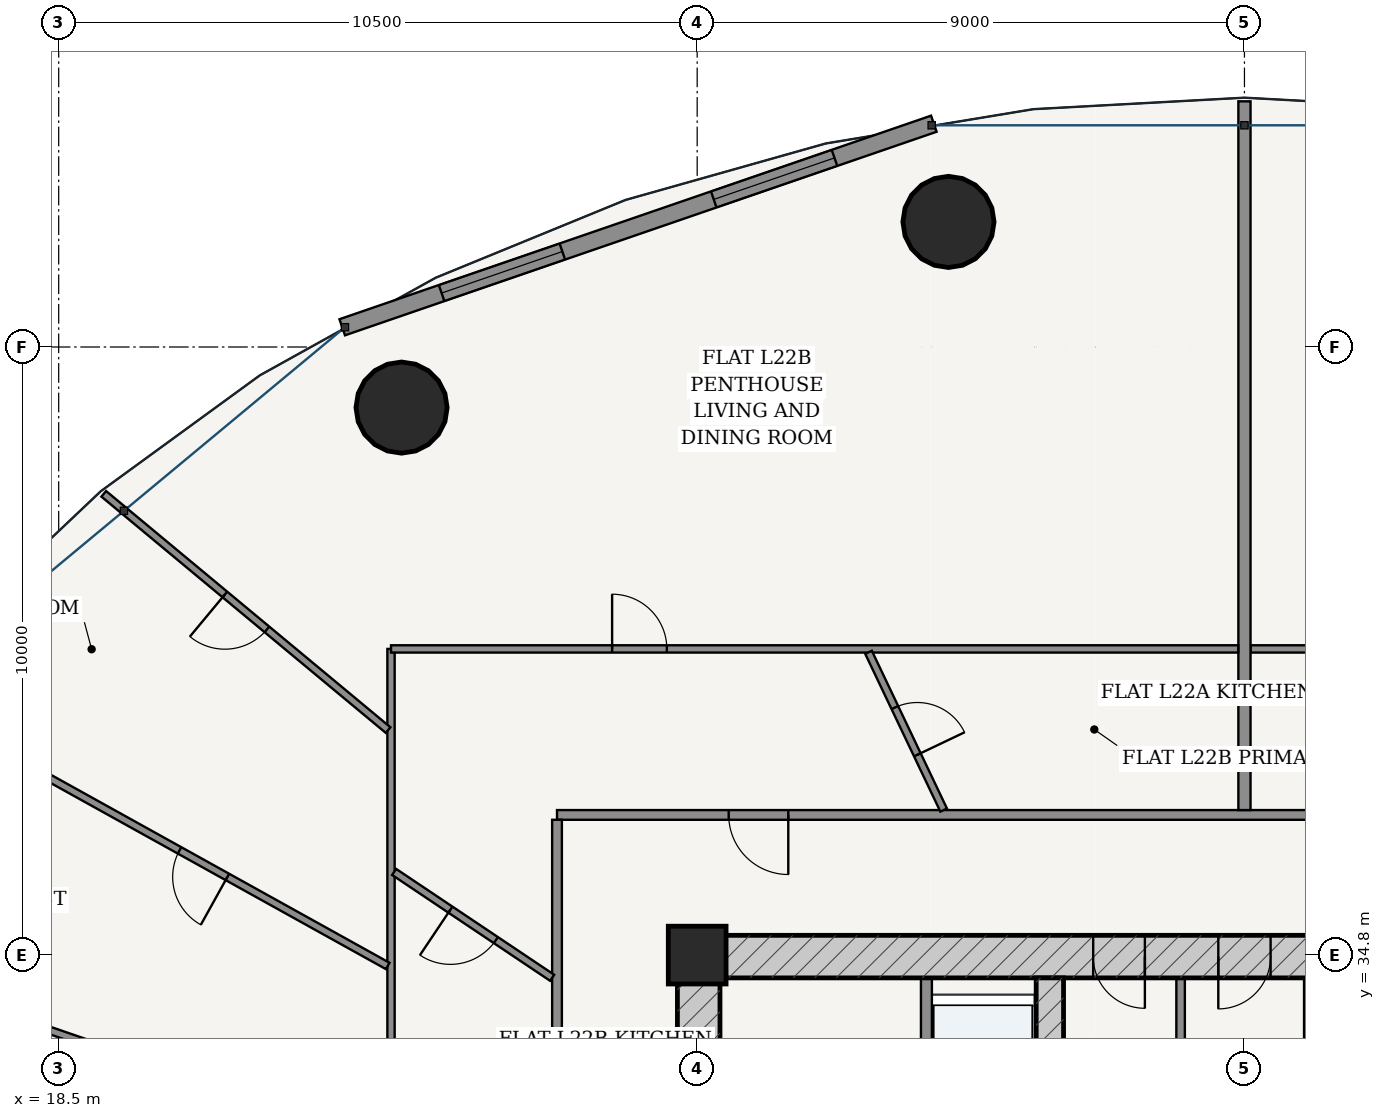
"""IFC4 building model, lengths in metres.
Left out: names, types, materials, properties, quantities, classifications, styles, units other than length and angle.
Written with IfcOpenShell. Run it as: python <this file> out.ifc"""

import sys

from ifc_helpers import new_model, si_unit, direction, frame, frame_2d, origin, origin_2d, place, context, subcontext, project, spatial, rectangle, hollow_circle, extrude, source, transform, mapped, element, fill, save


model = new_model("IFC4")
c1 = context("Model", 3, precision=1e-05, world=origin(), true_north=direction((-0.2419218956, 0.970295726276)))
c2 = subcontext(c1, "Body", "Model", "MODEL_VIEW")
j1 = project(units=[si_unit("LENGTHUNIT", "METRE"), si_unit("PLANEANGLEUNIT", "RADIAN")], contexts=[c1])
p1 = place(None, origin())
s1 = spatial("IfcSite", under=j1, at=p1, CompositionType="ELEMENT")
p2 = place(p1, origin())
s2 = spatial("IfcBuilding", under=s1, at=p2, CompositionType="ELEMENT")
p3 = place(p2, frame((0.0, 0.0, 87.0)))
s3 = spatial("IfcBuildingStorey", under=s2, at=p3, CompositionType="ELEMENT", Elevation=87.0)
p4 = place(p3, frame((29.0, 34.8, 0.0), z_axis=(0.0, 0.0, 1.0), x_axis=(1.0, 0.0, 0.0)))
e1 = element("IfcColumn", 1, at=p4, inside=s3, PredefinedType="COLUMN", context=c2, shape_type="SweptSolid", body=[
    extrude(rectangle(XDim=0.95, YDim=0.95, at=origin_2d()), origin(), (0.0, 0.0, 1.0), 3.6),
])
p5 = place(p3, frame((28.675, 34.775, 0.0), z_axis=(0.0, 0.0, 1.0), x_axis=(1.0, 0.0, 0.0)))
e2 = element("IfcWall", 2, at=p5, inside=s3, PredefinedType="SHEAR", context=c2, shape_type="SweptSolid", body=[
    extrude(rectangle(XDim=18.65, YDim=0.7, at=frame_2d((9.325, 0.0))), origin(), (0.0, 0.0, 1.0), 3.325),
])
p6 = place(p5, frame((6.837, 0.0, 0.0)))
e3 = element("IfcOpeningElement", 3, at=p6, cuts=e2, PredefinedType="OPENING", context=c2, shape_type="SweptSolid", body=[
    extrude(rectangle(XDim=0.85, YDim=2.1, at=frame_2d((0.425, 1.05))), frame((0.0, 0.36, 0.0), z_axis=(0.0, -1.0, 0.0), x_axis=(1.0, 0.0, 0.0)), (0.0, 0.0, 1.0), 0.72),
])
p7 = place(p5, frame((8.895, 0.0, 0.0)))
e4 = element("IfcOpeningElement", 4, at=p7, cuts=e2, PredefinedType="OPENING", context=c2, shape_type="SweptSolid", body=[
    extrude(rectangle(XDim=0.86, YDim=2.1, at=frame_2d((0.43, 1.05))), frame((0.0, 0.36, 0.0), z_axis=(0.0, -1.0, 0.0), x_axis=(1.0, 0.0, 0.0)), (0.0, 0.0, 1.0), 0.72),
])
p8 = place(p5, frame((10.962, 0.0, 0.0)))
e5 = element("IfcOpeningElement", 5, at=p8, cuts=e2, PredefinedType="OPENING", context=c2, shape_type="SweptSolid", body=[
    extrude(rectangle(XDim=0.85, YDim=2.1, at=frame_2d((0.425, 1.05))), frame((0.0, 0.36, 0.0), z_axis=(0.0, -1.0, 0.0), x_axis=(1.0, 0.0, 0.0)), (0.0, 0.0, 1.0), 0.72),
])
p9 = place(p3, frame((29.025, 19.175, 0.0), z_axis=(0.0, 0.0, 1.0), x_axis=(0.0, 1.0, 0.0)))
e6 = element("IfcWall", 6, at=p9, inside=s3, PredefinedType="SHEAR", context=c2, shape_type="SweptSolid", body=[
    extrude(rectangle(XDim=15.25, YDim=0.7, at=frame_2d((7.625, 0.0))), origin(), (0.0, 0.0, 1.0), 3.325),
])
p10 = place(p9, frame((9.875, 0.0, 0.0)))
e7 = element("IfcOpeningElement", 7, at=p10, cuts=e6, PredefinedType="OPENING", context=c2, shape_type="SweptSolid", body=[
    extrude(rectangle(XDim=1.5, YDim=2.2, at=frame_2d((0.75, 1.1))), frame((0.0, 0.36, 0.0), z_axis=(0.0, -1.0, 0.0), x_axis=(1.0, 0.0, 0.0)), (0.0, 0.0, 1.0), 0.72),
])
p11 = place(p3, frame((34.8, 19.175, 0.0), z_axis=(0.0, 0.0, 1.0), x_axis=(0.0, 1.0, 0.0)))
e8 = element("IfcWall", 8, at=p11, inside=s3, PredefinedType="SHEAR", context=c2, shape_type="SweptSolid", body=[
    extrude(rectangle(XDim=15.25, YDim=0.45, at=frame_2d((7.625, 0.0))), origin(), (0.0, 0.0, 1.0), 3.325),
])
p12 = place(p11, frame((7.8, 0.0, 0.0)))
e9 = element("IfcOpeningElement", 9, at=p12, cuts=e8, PredefinedType="OPENING", context=c2, shape_type="SweptSolid", body=[
    extrude(rectangle(XDim=1.05, YDim=2.15, at=frame_2d((0.525, 1.075))), frame((0.0, 0.235, 0.0), z_axis=(0.0, -1.0, 0.0), x_axis=(1.0, 0.0, 0.0)), (0.0, 0.0, 1.0), 0.47),
])
for number, where, z_axis, x_axis in (
    (10, (33.133, 46.857, 0.0), (0.0, 0.0, 1.0), (1.0, 0.0, 0.0)),
    (11, (24.138, 43.803, 0.0), (0.0, 0.0, 1.0), (1.0, 0.0, 0.0)),
):
    element("IfcColumn", number, at=place(p3, frame(where, z_axis=z_axis, x_axis=x_axis)), inside=s3, PredefinedType="COLUMN", context=c2, shape_type="SweptSolid", body=[
        extrude(hollow_circle(Radius=0.75, WallThickness=0.045, at=origin_2d()), origin(), (0.0, 0.0, 1.0), 3.6),
    ])
p13 = place(p3, frame((32.892, 48.472, 0.0), z_axis=(0.0, 0.0, 1.0), x_axis=(-0.945597432299, -0.325339047809, 0.0)))
e12 = element("IfcWall", 12, at=p13, inside=s3, PredefinedType="SOLIDWALL", context=c2, shape_type="SweptSolid", body=[
    extrude(rectangle(XDim=10.289, YDim=0.28, at=frame_2d((5.145, 0.0))), origin(), (0.0, 0.0, 1.0), 3.325),
])
p14 = place(p13, frame((1.728, 0.0, 0.85)))
e13 = element("IfcOpeningElement", 13, at=p14, cuts=e12, PredefinedType="OPENING", context=c2, shape_type="SweptSolid", body=[
    extrude(rectangle(XDim=2.1, YDim=1.95, at=frame_2d((1.05, 0.975))), frame((0.0, 0.15, 0.0), z_axis=(0.0, -1.0, 0.0), x_axis=(1.0, 0.0, 0.0)), (0.0, 0.0, 1.0), 0.3),
])
p15 = place(p13, frame((6.461, 0.0, 0.85)))
e14 = element("IfcOpeningElement", 14, at=p15, cuts=e12, PredefinedType="OPENING", context=c2, shape_type="SweptSolid", body=[
    extrude(rectangle(XDim=2.1, YDim=1.95, at=frame_2d((1.05, 0.975))), frame((0.0, 0.15, 0.0), z_axis=(0.0, -1.0, 0.0), x_axis=(1.0, 0.0, 0.0)), (0.0, 0.0, 1.0), 0.3),
])
p16 = place(p3, frame((32.77, 28.52, 0.0), z_axis=(0.0, 0.0, 1.0), x_axis=(0.0, 1.0, 0.0)))
e15 = element("IfcWall", 15, at=p16, inside=s3, PredefinedType="PARTITIONING", context=c2, shape_type="SweptSolid", body=[
    extrude(rectangle(XDim=5.905, YDim=0.18, at=frame_2d((2.953, 0.0))), origin(), (0.0, 0.0, 1.0), 3.325),
])
p17 = place(p16, frame((3.655, 0.0, 0.0)))
e16 = element("IfcOpeningElement", 16, at=p17, cuts=e15, PredefinedType="OPENING", context=c2, shape_type="SweptSolid", body=[
    extrude(rectangle(XDim=1.15, YDim=2.2, at=frame_2d((0.575, 1.1))), frame((0.0, 0.1, 0.0), z_axis=(0.0, -1.0, 0.0), x_axis=(1.0, 0.0, 0.0)), (0.0, 0.0, 1.0), 0.2),
])
p18 = place(p16, frame((0.73, 0.0, 0.0)))
e17 = element("IfcOpeningElement", 17, at=p18, cuts=e15, PredefinedType="OPENING", context=c2, shape_type="SweptSolid", body=[
    extrude(rectangle(XDim=1.2, YDim=2.25, at=frame_2d((0.6, 1.125))), frame((0.0, 0.1, 0.0), z_axis=(0.0, -1.0, 0.0), x_axis=(1.0, 0.0, 0.0)), (0.0, 0.0, 1.0), 0.2),
])
for number, where, z_axis, x_axis in (
    (18, (36.95, 31.2, 0.0), (0.0, 0.0, 1.0), (0.0, 1.0, 0.0)),
    (19, (39.05, 31.2, 0.0), (0.0, 0.0, 1.0), (0.0, 1.0, 0.0)),
):
    element("IfcWall", number, at=place(p3, frame(where, z_axis=z_axis, x_axis=x_axis)), inside=s3, PredefinedType="PARTITIONING", context=c2, shape_type="SweptSolid", body=[
        extrude(rectangle(XDim=3.225, YDim=0.14, at=frame_2d((1.613, 0.0))), origin(), (0.0, 0.0, 1.0), 3.325),
    ])
p19 = place(p3, frame((26.695, 37.105, 0.0), z_axis=(0.0, 0.0, 1.0), x_axis=(1.0, 0.0, 0.0)))
e20 = element("IfcWall", 20, at=p19, inside=s3, PredefinedType="PARTITIONING", context=c2, shape_type="SweptSolid", body=[
    extrude(rectangle(XDim=22.61, YDim=0.16, at=frame_2d((11.305, 0.0))), origin(), (0.0, 0.0, 1.0), 2.767),
])
p20 = place(p19, frame((18.812, 0.0, 0.0)))
e21 = element("IfcOpeningElement", 21, at=p20, cuts=e20, PredefinedType="OPENING", context=c2, shape_type="SweptSolid", body=[
    extrude(rectangle(XDim=0.98, YDim=2.2, at=frame_2d((0.49, 1.1))), frame((0.0, 0.09, 0.0), z_axis=(0.0, -1.0, 0.0), x_axis=(1.0, 0.0, 0.0)), (0.0, 0.0, 1.0), 0.18),
])
p21 = place(p19, frame((2.823, 0.0, 0.0)))
e22 = element("IfcOpeningElement", 22, at=p21, cuts=e20, PredefinedType="OPENING", context=c2, shape_type="SweptSolid", body=[
    extrude(rectangle(XDim=0.98, YDim=2.2, at=frame_2d((0.49, 1.1))), frame((0.0, 0.09, 0.0), z_axis=(0.0, -1.0, 0.0), x_axis=(1.0, 0.0, 0.0)), (0.0, 0.0, 1.0), 0.18),
])
p22 = place(p3, frame((26.695, 16.575, 0.0), z_axis=(0.0, 0.0, 1.0), x_axis=(0.0, 1.0, 0.0)))
e23 = element("IfcWall", 23, at=p22, inside=s3, PredefinedType="PARTITIONING", context=c2, shape_type="SweptSolid", body=[
    extrude(rectangle(XDim=20.45, YDim=0.16, at=frame_2d((10.225, 0.0))), origin(), (0.0, 0.0, 1.0), 2.767),
])
p23 = place(p22, frame((1.977, 0.0, 0.0)))
e24 = element("IfcOpeningElement", 24, at=p23, cuts=e23, PredefinedType="OPENING", context=c2, shape_type="SweptSolid", body=[
    extrude(rectangle(XDim=0.98, YDim=2.2, at=frame_2d((0.49, 1.1))), frame((0.0, 0.09, 0.0), z_axis=(0.0, -1.0, 0.0), x_axis=(1.0, 0.0, 0.0)), (0.0, 0.0, 1.0), 0.18),
])
p24 = place(p3, frame((38.102, 39.835, 0.0), z_axis=(0.0, 0.0, 1.0), x_axis=(1.0, 0.0, 0.0)))
e25 = element("IfcWall", 25, at=p24, inside=s3, PredefinedType="PARTITIONING", context=c2, shape_type="SweptSolid", body=[
    extrude(rectangle(XDim=13.933, YDim=0.12, at=frame_2d((6.966, 0.0))), origin(), (0.0, 0.0, 1.0), 2.767),
])
p25 = place(p24, frame((2.769, 0.0, 0.0)))
e26 = element("IfcOpeningElement", 26, at=p25, cuts=e25, PredefinedType="OPENING", context=c2, shape_type="SweptSolid", body=[
    extrude(rectangle(XDim=0.9, YDim=2.15, at=frame_2d((0.45, 1.075))), frame((0.0, 0.07, 0.0), z_axis=(0.0, -1.0, 0.0), x_axis=(1.0, 0.0, 0.0)), (0.0, 0.0, 1.0), 0.14),
])
p26 = place(p3, frame((38.0, 37.185, 0.0), z_axis=(0.0, 0.0, 1.0), x_axis=(0.0, 1.0, 0.0)))
e27 = element("IfcWall", 27, at=p26, inside=s3, PredefinedType="PARTITIONING", context=c2, shape_type="SweptSolid", body=[
    extrude(rectangle(XDim=11.655, YDim=0.2, at=frame_2d((5.828, 0.0))), origin(), (0.0, 0.0, 1.0), 2.767),
])
p27 = place(p3, frame((23.965, 24.583, 0.0), z_axis=(0.0, 0.0, 1.0), x_axis=(0.0, 1.0, 0.0)))
e28 = element("IfcWall", 28, at=p27, inside=s3, PredefinedType="PARTITIONING", context=c2, shape_type="SweptSolid", body=[
    extrude(rectangle(XDim=15.252, YDim=0.12, at=frame_2d((7.626, 0.0))), origin(), (0.0, 0.0, 1.0), 2.767),
])
p28 = place(p3, frame((23.965, 39.835, 0.0), z_axis=(0.0, 0.0, 1.0), x_axis=(1.0, 0.0, 0.0)))
e29 = element("IfcWall", 29, at=p28, inside=s3, PredefinedType="PARTITIONING", context=c2, shape_type="SweptSolid", body=[
    extrude(rectangle(XDim=13.933, YDim=0.12, at=frame_2d((6.966, 0.0))), origin(), (0.0, 0.0, 1.0), 2.767),
])
p29 = place(p28, frame((3.636, 0.0, 0.0)))
e30 = element("IfcOpeningElement", 30, at=p29, cuts=e29, PredefinedType="OPENING", context=c2, shape_type="SweptSolid", body=[
    extrude(rectangle(XDim=0.9, YDim=2.15, at=frame_2d((0.45, 1.075))), frame((0.0, 0.07, 0.0), z_axis=(0.0, -1.0, 0.0), x_axis=(1.0, 0.0, 0.0)), (0.0, 0.0, 1.0), 0.14),
])
p30 = place(p3, frame((23.917, 38.5, 0.0), z_axis=(0.0, 0.0, 1.0), x_axis=(-0.769161827891, 0.63905405289, 0.0)))
e31 = element("IfcWall", 31, at=p30, inside=s3, PredefinedType="PARTITIONING", context=c2, shape_type="SweptSolid", body=[
    extrude(rectangle(XDim=6.08, YDim=0.12, at=frame_2d((3.04, 0.0))), origin(), (0.0, 0.0, 1.0), 2.767),
])
p31 = place(p30, frame((2.59, 0.0, 0.0)))
e32 = element("IfcOpeningElement", 32, at=p31, cuts=e31, PredefinedType="OPENING", context=c2, shape_type="SweptSolid", body=[
    extrude(rectangle(XDim=0.9, YDim=2.15, at=frame_2d((0.45, 1.075))), frame((0.0, 0.07, 0.0), z_axis=(0.0, -1.0, 0.0), x_axis=(1.0, 0.0, 0.0)), (0.0, 0.0, 1.0), 0.14),
])
p32 = place(p3, frame((23.911, 34.622, 0.0), z_axis=(0.0, 0.0, 1.0), x_axis=(-0.874324904351, 0.485341077626, 0.0)))
e33 = element("IfcWall", 33, at=p32, inside=s3, PredefinedType="PARTITIONING", context=c2, shape_type="SweptSolid", body=[
    extrude(rectangle(XDim=9.066, YDim=0.12, at=frame_2d((4.533, 0.0))), origin(), (0.0, 0.0, 1.0), 2.767),
])
p33 = place(p32, frame((3.016, 0.0, 0.0)))
e34 = element("IfcOpeningElement", 34, at=p33, cuts=e33, PredefinedType="OPENING", context=c2, shape_type="SweptSolid", body=[
    extrude(rectangle(XDim=0.9, YDim=2.15, at=frame_2d((0.45, 1.075))), frame((0.0, 0.07, 0.0), z_axis=(0.0, -1.0, 0.0), x_axis=(1.0, 0.0, 0.0)), (0.0, 0.0, 1.0), 0.14),
])
p34 = place(p3, frame((23.906, 31.65, 0.0), z_axis=(0.0, 0.0, 1.0), x_axis=(-0.945573120726, 0.32540970078, 0.0)))
e35 = element("IfcWall", 35, at=p34, inside=s3, PredefinedType="PARTITIONING", context=c2, shape_type="SweptSolid", body=[
    extrude(rectangle(XDim=11.022, YDim=0.12, at=frame_2d((5.511, 0.0))), origin(), (0.0, 0.0, 1.0), 2.767),
])
p35 = place(p34, frame((5.061, 0.0, 0.0)))
e36 = element("IfcOpeningElement", 36, at=p35, cuts=e35, PredefinedType="OPENING", context=c2, shape_type="SweptSolid", body=[
    extrude(rectangle(XDim=0.9, YDim=2.15, at=frame_2d((0.45, 1.075))), frame((0.0, 0.07, 0.0), z_axis=(0.0, -1.0, 0.0), x_axis=(1.0, 0.0, 0.0)), (0.0, 0.0, 1.0), 0.14),
])
p36 = place(p3, frame((33.053, 37.185, 0.0), z_axis=(0.0, 0.0, 1.0), x_axis=(-0.429966564324, 0.902844811451, 0.0)))
e37 = element("IfcWall", 37, at=p36, inside=s3, PredefinedType="PARTITIONING", context=c2, shape_type="SweptSolid", body=[
    extrude(rectangle(XDim=2.873, YDim=0.12, at=frame_2d((1.437, 0.0))), origin(), (0.0, 0.0, 1.0), 3.325),
])
p37 = place(p36, frame((1.007, 0.0, 0.0)))
e38 = element("IfcOpeningElement", 38, at=p37, cuts=e37, PredefinedType="OPENING", context=c2, shape_type="SweptSolid", body=[
    extrude(rectangle(XDim=0.86, YDim=2.15, at=frame_2d((0.43, 1.075))), frame((0.0, 0.07, 0.0), z_axis=(0.0, -1.0, 0.0), x_axis=(1.0, 0.0, 0.0)), (0.0, 0.0, 1.0), 0.14),
])
p38 = place(p3, frame((26.615, 34.427, 0.0), z_axis=(0.0, 0.0, 1.0), x_axis=(-0.830799215213, 0.556572245088, 0.0)))
e39 = element("IfcWall", 39, at=p38, inside=s3, PredefinedType="PARTITIONING", context=c2, shape_type="SweptSolid", body=[
    extrude(rectangle(XDim=3.128, YDim=0.12, at=frame_2d((1.564, 0.0))), origin(), (0.0, 0.0, 1.0), 3.004),
])
p39 = place(p38, frame((1.114, 0.0, 0.0)))
e40 = element("IfcOpeningElement", 40, at=p39, cuts=e39, PredefinedType="OPENING", context=c2, shape_type="SweptSolid", body=[
    extrude(rectangle(XDim=0.9, YDim=2.15, at=frame_2d((0.45, 1.075))), frame((0.0, 0.07, 0.0), z_axis=(0.0, -1.0, 0.0), x_axis=(1.0, 0.0, 0.0)), (0.0, 0.0, 1.0), 0.14),
])
m1 = source(origin(), c2, "Body", "SweptSolid", [
    extrude(rectangle(XDim=2.1, YDim=1.95, at=frame_2d((1.05, 0.975))), frame((0.0, 0.03, 0.0), z_axis=(0.0, -1.0, 0.0), x_axis=(1.0, 0.0, 0.0)), (0.0, 0.0, 1.0), 0.06),
])
p40 = place(p14, origin())
e41 = element("IfcWindow", 41, at=p40, inside=s3, PartitioningType="SINGLE_PANEL", PredefinedType="WINDOW", context=c2, shape_type="MappedRepresentation", body=[
    mapped(m1, transform((0.0, 0.0, 0.0), scale=1.0)),
])
fill(e13, e41)
p41 = place(p15, origin())
e42 = element("IfcWindow", 42, at=p41, inside=s3, PartitioningType="SINGLE_PANEL", PredefinedType="WINDOW", context=c2, shape_type="MappedRepresentation", body=[
    mapped(m1, transform((0.0, 0.0, 0.0), scale=1.0)),
])
fill(e14, e42)
m2 = source(origin(), c2, "Body", "SweptSolid", [
    extrude(rectangle(XDim=0.85, YDim=2.1, at=frame_2d((0.425, 1.05))), frame((0.0, 0.025, 0.0), z_axis=(0.0, -1.0, 0.0), x_axis=(1.0, 0.0, 0.0)), (0.0, 0.0, 1.0), 0.05),
])
p42 = place(p6, frame((0.85, 0.0, 0.0), z_axis=(0.0, 0.0, 1.0), x_axis=(-1.0, 0.0, 0.0)))
e43 = element("IfcDoor", 43, at=p42, inside=s3, OperationType="SINGLE_SWING_LEFT", PredefinedType="DOOR", context=c2, shape_type="MappedRepresentation", body=[
    mapped(m2, transform((0.0, 0.0, 0.0), scale=1.0)),
])
fill(e3, e43)
m3 = source(origin(), c2, "Body", "SweptSolid", [
    extrude(rectangle(XDim=0.86, YDim=2.1, at=frame_2d((0.43, 1.05))), frame((0.0, 0.025, 0.0), z_axis=(0.0, -1.0, 0.0), x_axis=(1.0, 0.0, 0.0)), (0.0, 0.0, 1.0), 0.05),
])
p43 = place(p7, frame((0.86, 0.0, 0.0), z_axis=(0.0, 0.0, 1.0), x_axis=(-1.0, 0.0, 0.0)))
e44 = element("IfcDoor", 44, at=p43, inside=s3, OperationType="SINGLE_SWING_RIGHT", PredefinedType="DOOR", context=c2, shape_type="MappedRepresentation", body=[
    mapped(m3, transform((0.0, 0.0, 0.0), scale=1.0)),
])
fill(e4, e44)
m4 = source(origin(), c2, "Body", "SweptSolid", [
    extrude(rectangle(XDim=0.98, YDim=2.2, at=frame_2d((0.49, 1.1))), frame((0.0, 0.025, 0.0), z_axis=(0.0, -1.0, 0.0), x_axis=(1.0, 0.0, 0.0)), (0.0, 0.0, 1.0), 0.05),
])
p44 = place(p21, frame((0.98, 0.0, 0.0), z_axis=(0.0, 0.0, 1.0), x_axis=(-1.0, 0.0, 0.0)))
e45 = element("IfcDoor", 45, at=p44, inside=s3, OperationType="SINGLE_SWING_LEFT", PredefinedType="DOOR", context=c2, shape_type="MappedRepresentation", body=[
    mapped(m4, transform((0.0, 0.0, 0.0), scale=1.0)),
])
fill(e22, e45)
m5 = source(origin(), c2, "Body", "SweptSolid", [
    extrude(rectangle(XDim=0.86, YDim=2.15, at=frame_2d((0.43, 1.075))), frame((0.0, 0.025, 0.0), z_axis=(0.0, -1.0, 0.0), x_axis=(1.0, 0.0, 0.0)), (0.0, 0.0, 1.0), 0.05),
])
p45 = place(p37, frame((0.86, 0.0, 0.0), z_axis=(0.0, 0.0, 1.0), x_axis=(-1.0, 0.0, 0.0)))
e46 = element("IfcDoor", 46, at=p45, inside=s3, OperationType="SINGLE_SWING_RIGHT", PredefinedType="DOOR", context=c2, shape_type="MappedRepresentation", body=[
    mapped(m5, transform((0.0, 0.0, 0.0), scale=1.0)),
])
fill(e38, e46)
m6 = source(origin(), c2, "Body", "SweptSolid", [
    extrude(rectangle(XDim=0.9, YDim=2.15, at=frame_2d((0.45, 1.075))), frame((0.0, 0.025, 0.0), z_axis=(0.0, -1.0, 0.0), x_axis=(1.0, 0.0, 0.0)), (0.0, 0.0, 1.0), 0.05),
])
p46 = place(p29, origin())
e47 = element("IfcDoor", 47, at=p46, inside=s3, OperationType="SINGLE_SWING_LEFT", PredefinedType="DOOR", context=c2, shape_type="MappedRepresentation", body=[
    mapped(m6, transform((0.0, 0.0, 0.0), scale=1.0)),
])
fill(e30, e47)
p47 = place(p39, origin())
e48 = element("IfcDoor", 48, at=p47, inside=s3, OperationType="SINGLE_SWING_RIGHT", PredefinedType="DOOR", context=c2, shape_type="MappedRepresentation", body=[
    mapped(m6, transform((0.0, 0.0, 0.0), scale=1.0)),
])
fill(e40, e48)
p48 = place(p31, origin())
e49 = element("IfcDoor", 49, at=p48, inside=s3, OperationType="SINGLE_SWING_RIGHT", PredefinedType="DOOR", context=c2, shape_type="MappedRepresentation", body=[
    mapped(m6, transform((0.0, 0.0, 0.0), scale=1.0)),
])
fill(e32, e49)
p49 = place(p33, origin())
e50 = element("IfcDoor", 50, at=p49, inside=s3, OperationType="SINGLE_SWING_LEFT", PredefinedType="DOOR", context=c2, shape_type="MappedRepresentation", body=[
    mapped(m6, transform((0.0, 0.0, 0.0), scale=1.0)),
])
fill(e34, e50)
p50 = place(p35, origin())
e51 = element("IfcDoor", 51, at=p50, inside=s3, OperationType="SINGLE_SWING_RIGHT", PredefinedType="DOOR", context=c2, shape_type="MappedRepresentation", body=[
    mapped(m6, transform((0.0, 0.0, 0.0), scale=1.0)),
])
fill(e36, e51)
save(model, sys.argv[1])
